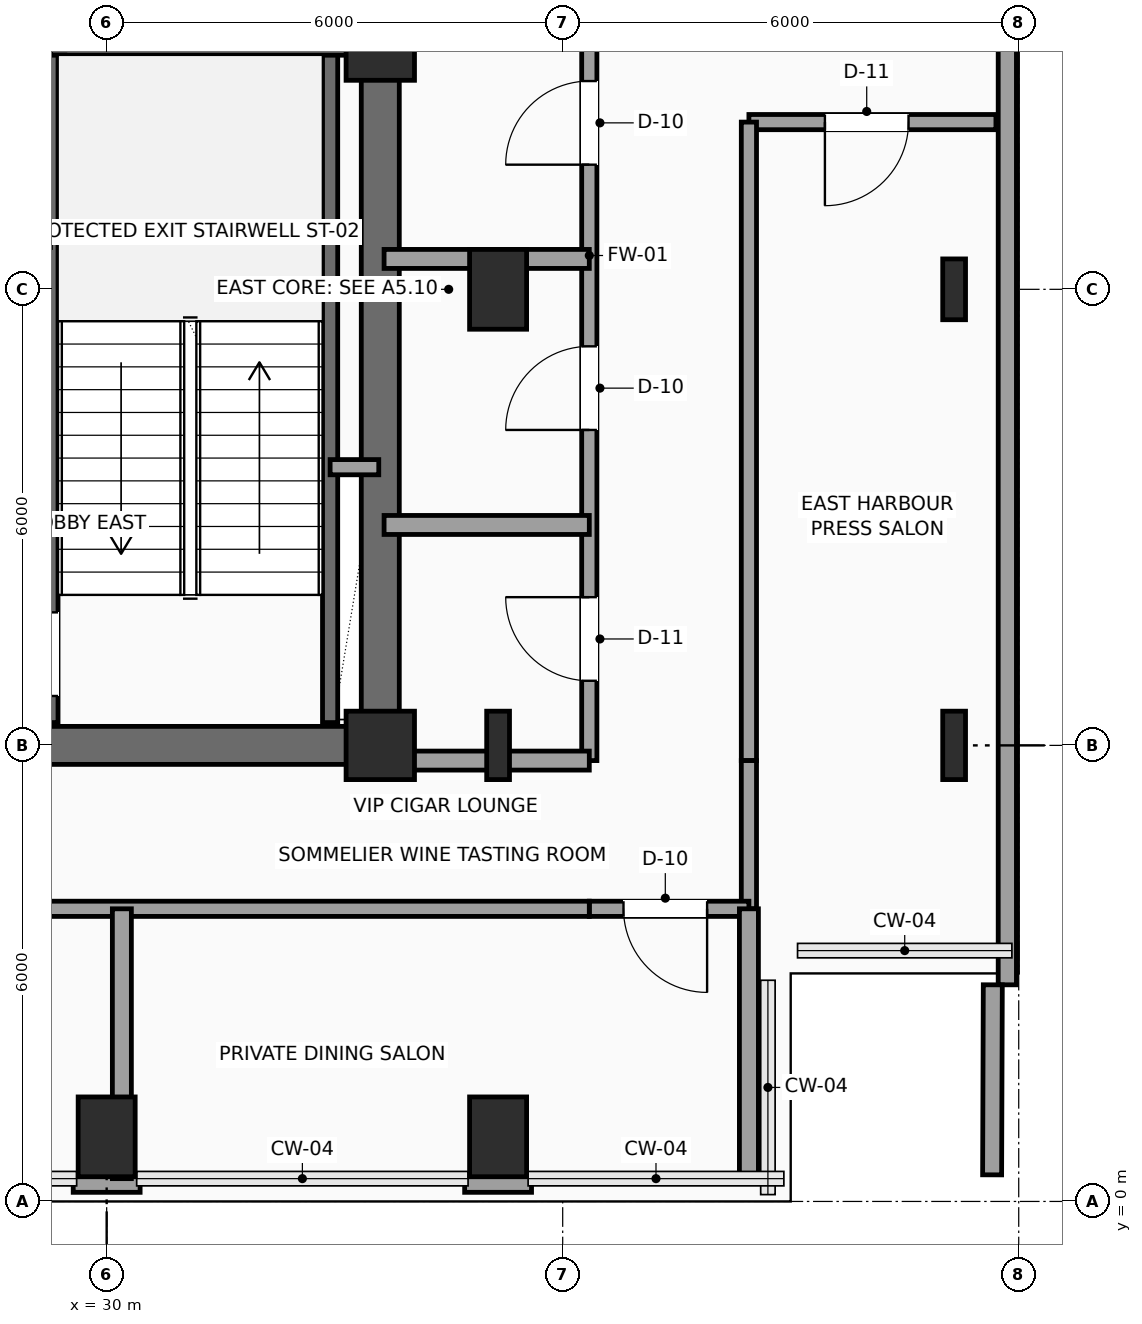
"""IFC4 building model, lengths in metres.
Left out: names, types, materials, properties, quantities, classifications, styles, units other than length and angle.
Written with IfcOpenShell. Run it as: python <this file> out.ifc"""

import sys

from ifc_helpers import new_model, si_unit, direction, frame, frame_2d, origin, origin_2d, place, context, subcontext, project, spatial, rectangle, i_section, extrude, element, fill, save


model = new_model("IFC4")
c1 = context("Model", 3, precision=1e-05, world=origin(), true_north=direction((0.0, 1.0)))
c2 = subcontext(c1, "Body", "Model", "MODEL_VIEW")
j1 = project(units=[si_unit("LENGTHUNIT", "METRE"), si_unit("PLANEANGLEUNIT", "RADIAN")], contexts=[c1])
p1 = place(None, origin())
s1 = spatial("IfcSite", under=j1, at=p1, CompositionType="ELEMENT")
p2 = place(p1, origin())
s2 = spatial("IfcBuilding", under=s1, at=p2, CompositionType="ELEMENT")
p3 = place(p2, frame((0.0, 0.0, 187.95)))
s3 = spatial("IfcBuildingStorey", under=s2, at=p3, CompositionType="ELEMENT", Elevation=187.95)
for number, where, z_axis, x_axis in (
    (1, (33.6, 6.0, 0.0), (0.0, 0.0, 1.0), (1.0, 0.0, 0.0)),
    (2, (33.6, 15.2, 0.0), (0.0, 0.0, 1.0), (1.0, 0.0, 0.0)),
):
    element("IfcColumn", number, at=place(p3, frame(where, z_axis=z_axis, x_axis=x_axis)), inside=s3, PredefinedType="COLUMN", context=c2, shape_type="SweptSolid", body=[
        extrude(rectangle(XDim=0.9, YDim=0.9, at=origin_2d()), origin(), (0.0, 0.0, 1.0), 3.75),
    ])
for number, where, z_axis, x_axis in (
    (3, (30.0, 0.85, 0.0), (0.0, 0.0, 1.0), (1.0, 0.0, 0.0)),
    (4, (35.15, 0.85, 0.0), (0.0, 0.0, 1.0), (1.0, 0.0, 0.0)),
):
    element("IfcColumn", number, at=place(p3, frame(where, z_axis=z_axis, x_axis=x_axis)), inside=s3, PredefinedType="COLUMN", context=c2, shape_type="SweptSolid", body=[
        extrude(rectangle(XDim=0.75, YDim=1.05, at=origin_2d()), origin(), (0.0, 0.0, 1.0), 3.75),
    ])
p4 = place(p3, frame((35.15, 6.0, 0.0), z_axis=(0.0, 0.0, 1.0), x_axis=(1.0, 0.0, 0.0)))
e5 = element("IfcColumn", 5, at=p4, inside=s3, PredefinedType="COLUMN", context=c2, shape_type="SweptSolid", body=[
    extrude(i_section(OverallWidth=0.3, OverallDepth=0.9, WebThickness=0.019, FlangeThickness=0.035, FilletRadius=0.03, at=origin_2d()), origin(), (0.0, 0.0, 1.0), 3.75),
])
p5 = place(p3, frame((35.15, 12.0, 0.0), z_axis=(0.0, 0.0, 1.0), x_axis=(1.0, 0.0, 0.0)))
e6 = element("IfcColumn", 6, at=p5, inside=s3, PredefinedType="COLUMN", context=c2, shape_type="SweptSolid", body=[
    extrude(rectangle(XDim=0.75, YDim=1.05, at=origin_2d()), origin(), (0.0, 0.0, 1.0), 3.75),
])
p6 = place(p3, frame((41.15, 6.0, 0.0), z_axis=(0.0, 0.0, 1.0), x_axis=(1.0, 0.0, 0.0)))
e7 = element("IfcColumn", 7, at=p6, inside=s3, PredefinedType="COLUMN", context=c2, shape_type="SweptSolid", body=[
    extrude(i_section(OverallWidth=0.3, OverallDepth=0.9, WebThickness=0.019, FlangeThickness=0.035, FilletRadius=0.03, at=origin_2d()), origin(), (0.0, 0.0, 1.0), 3.75),
])
p7 = place(p3, frame((41.15, 12.0, 0.0), z_axis=(0.0, 0.0, 1.0), x_axis=(1.0, 0.0, 0.0)))
e8 = element("IfcColumn", 8, at=p7, inside=s3, PredefinedType="COLUMN", context=c2, shape_type="SweptSolid", body=[
    extrude(i_section(OverallWidth=0.3, OverallDepth=0.8, WebThickness=0.018, FlangeThickness=0.033, FilletRadius=0.03, at=origin_2d()), origin(), (0.0, 0.0, 1.0), 3.75),
])
p8 = place(p3, frame((41.85, 21.15, 0.0), z_axis=(0.0, 0.0, 1.0), x_axis=(0.0, -1.0, 0.0)))
e9 = element("IfcWall", 9, at=p8, inside=s3, PredefinedType="SOLIDWALL", context=c2, shape_type="SweptSolid", body=[
    extrude(rectangle(XDim=18.3, YDim=0.24, at=frame_2d((9.15, 0.0))), origin(), (0.0, 0.0, 1.0), 3.54),
])
p9 = place(p3, frame((35.59, 0.24, 0.0), z_axis=(0.0, 0.0, 1.0), x_axis=(-1.0, 0.0, 0.0)))
e10 = element("IfcWall", 10, at=p9, inside=s3, PredefinedType="SOLIDWALL", context=c2, shape_type="SweptSolid", body=[
    extrude(rectangle(XDim=0.88, YDim=0.24, at=frame_2d((0.44, 0.0))), origin(), (0.0, 0.0, 1.0), 3.54),
])
p10 = place(p3, frame((30.44, 0.24, 0.0), z_axis=(0.0, 0.0, 1.0), x_axis=(-1.0, 0.0, 0.0)))
e11 = element("IfcWall", 11, at=p10, inside=s3, PredefinedType="SOLIDWALL", context=c2, shape_type="SweptSolid", body=[
    extrude(rectangle(XDim=0.88, YDim=0.24, at=frame_2d((0.44, 0.0))), origin(), (0.0, 0.0, 1.0), 3.54),
])
p11 = place(p3, frame((24.0, 6.0, 0.0), z_axis=(0.0, 0.0, 1.0), x_axis=(1.0, 0.0, 0.0)))
e12 = element("IfcWall", 12, at=p11, inside=s3, PredefinedType="SHEAR", context=c2, shape_type="SweptSolid", body=[
    extrude(rectangle(XDim=9.6, YDim=0.5, at=frame_2d((4.8, 0.0))), origin(), (0.0, 0.0, 1.0), 3.54),
])
p12 = place(p3, frame((33.6, 6.0, 0.0), z_axis=(0.0, 0.0, 1.0), x_axis=(0.0, 1.0, 0.0)))
e13 = element("IfcWall", 13, at=p12, inside=s3, PredefinedType="SHEAR", context=c2, shape_type="SweptSolid", body=[
    extrude(rectangle(XDim=12.0, YDim=0.5, at=frame_2d((6.0, 0.0))), origin(), (0.0, 0.0, 1.0), 3.54),
])
p13 = place(p12, frame((10.15, 0.0, 0.0)))
e14 = element("IfcOpeningElement", 14, at=p13, cuts=e13, PredefinedType="OPENING", context=c2, shape_type="SweptSolid", body=[
    extrude(rectangle(XDim=0.9, YDim=2.15, at=frame_2d((0.45, 1.075))), frame((0.0, 0.26, 0.0), z_axis=(0.0, -1.0, 0.0), x_axis=(1.0, 0.0, 0.0)), (0.0, 0.0, 1.0), 0.52),
])
p14 = place(p3, frame((29.26, 6.3, 0.0), z_axis=(0.0, 0.0, 1.0), x_axis=(0.0, 1.0, 0.0)))
e15 = element("IfcWall", 15, at=p14, inside=s3, PredefinedType="SHEAR", context=c2, shape_type="SweptSolid", body=[
    extrude(rectangle(XDim=8.88, YDim=0.2, at=frame_2d((4.44, 0.0))), origin(), (0.0, 0.0, 1.0), 3.54),
])
p15 = place(p14, frame((0.35, 0.0, 0.0)))
e16 = element("IfcOpeningElement", 16, at=p15, cuts=e15, PredefinedType="OPENING", context=c2, shape_type="SweptSolid", body=[
    extrude(rectangle(XDim=1.1, YDim=2.2, at=frame_2d((0.55, 1.1))), frame((0.0, 0.11, 0.0), z_axis=(0.0, -1.0, 0.0), x_axis=(1.0, 0.0, 0.0)), (0.0, 0.0, 1.0), 0.22),
])
p16 = place(p3, frame((32.94, 6.3, 0.0), z_axis=(0.0, 0.0, 1.0), x_axis=(0.0, 1.0, 0.0)))
e17 = element("IfcWall", 17, at=p16, inside=s3, PredefinedType="SHEAR", context=c2, shape_type="SweptSolid", body=[
    extrude(rectangle(XDim=8.88, YDim=0.2, at=frame_2d((4.44, 0.0))), origin(), (0.0, 0.0, 1.0), 3.54),
])
p17 = place(p3, frame((29.26, 15.18, 0.0), z_axis=(0.0, 0.0, 1.0), x_axis=(1.0, 0.0, 0.0)))
e18 = element("IfcWall", 18, at=p17, inside=s3, PredefinedType="SHEAR", context=c2, shape_type="SweptSolid", body=[
    extrude(rectangle(XDim=4.04, YDim=0.2, at=frame_2d((2.02, 0.0))), origin(), (0.0, 0.0, 1.0), 3.54),
])
p18 = place(p3, frame((32.94, 9.66, 0.0), z_axis=(0.0, 0.0, 1.0), x_axis=(1.0, 0.0, 0.0)))
e19 = element("IfcWall", 19, at=p18, inside=s3, PredefinedType="SOLIDWALL", context=c2, shape_type="SweptSolid", body=[
    extrude(rectangle(XDim=0.64, YDim=0.2, at=frame_2d((0.32, 0.0))), origin(), (0.0, 0.0, 1.0), 3.54),
])
p19 = place(p3, frame((36.35, 5.8, 0.0), z_axis=(0.0, 0.0, 1.0), x_axis=(0.0, 1.0, 0.0)))
e20 = element("IfcWall", 20, at=p19, inside=s3, PredefinedType="SOLIDWALL", context=c2, shape_type="SweptSolid", body=[
    extrude(rectangle(XDim=10.08, YDim=0.2, at=frame_2d((5.04, 0.0))), origin(), (0.0, 0.0, 1.0), 3.54),
])
p20 = place(p19, frame((1.05, 0.0, 0.0)))
e21 = element("IfcOpeningElement", 21, at=p20, cuts=e20, PredefinedType="OPENING", context=c2, shape_type="SweptSolid", body=[
    extrude(rectangle(XDim=1.1, YDim=2.25, at=frame_2d((0.55, 1.125))), frame((0.0, 0.11, 0.0), z_axis=(0.0, -1.0, 0.0), x_axis=(1.0, 0.0, 0.0)), (0.0, 0.0, 1.0), 0.22),
])
p21 = place(p19, frame((4.35, 0.0, 0.0)))
e22 = element("IfcOpeningElement", 22, at=p21, cuts=e20, PredefinedType="OPENING", context=c2, shape_type="SweptSolid", body=[
    extrude(rectangle(XDim=1.1, YDim=2.25, at=frame_2d((0.55, 1.125))), frame((0.0, 0.11, 0.0), z_axis=(0.0, -1.0, 0.0), x_axis=(1.0, 0.0, 0.0)), (0.0, 0.0, 1.0), 0.22),
])
p22 = place(p19, frame((7.84, 0.0, 0.0)))
e23 = element("IfcOpeningElement", 23, at=p22, cuts=e20, PredefinedType="OPENING", context=c2, shape_type="SweptSolid", body=[
    extrude(rectangle(XDim=1.1, YDim=2.25, at=frame_2d((0.55, 1.125))), frame((0.0, 0.11, 0.0), z_axis=(0.0, -1.0, 0.0), x_axis=(1.0, 0.0, 0.0)), (0.0, 0.0, 1.0), 0.22),
])
p23 = place(p3, frame((41.7, 14.2, 0.0), z_axis=(0.0, 0.0, 1.0), x_axis=(-1.0, 0.0, 0.0)))
e24 = element("IfcWall", 24, at=p23, inside=s3, PredefinedType="SOLIDWALL", context=c2, shape_type="SweptSolid", body=[
    extrude(rectangle(XDim=3.25, YDim=0.2, at=frame_2d((1.625, 0.0))), origin(), (0.0, 0.0, 1.0), 3.54),
])
p24 = place(p23, frame((1.15, 0.0, 0.0)))
e25 = element("IfcOpeningElement", 25, at=p24, cuts=e24, PredefinedType="OPENING", context=c2, shape_type="SweptSolid", body=[
    extrude(rectangle(XDim=1.1, YDim=2.25, at=frame_2d((0.55, 1.125))), frame((0.0, 0.11, 0.0), z_axis=(0.0, -1.0, 0.0), x_axis=(1.0, 0.0, 0.0)), (0.0, 0.0, 1.0), 0.22),
])
p25 = place(p3, frame((38.45, 14.2, 0.0), z_axis=(0.0, 0.0, 1.0), x_axis=(0.0, -1.0, 0.0)))
e26 = element("IfcWall", 26, at=p25, inside=s3, PredefinedType="SOLIDWALL", context=c2, shape_type="SweptSolid", body=[
    extrude(rectangle(XDim=8.4, YDim=0.2, at=frame_2d((4.2, 0.0))), origin(), (0.0, 0.0, 1.0), 3.54),
])
p26 = place(p3, frame((38.45, 5.8, 0.0), z_axis=(0.0, 0.0, 1.0), x_axis=(0.0, -1.0, 0.0)))
e27 = element("IfcWall", 27, at=p26, inside=s3, PredefinedType="SOLIDWALL", context=c2, shape_type="SweptSolid", body=[
    extrude(rectangle(XDim=1.95, YDim=0.2, at=frame_2d((0.975, 0.0))), origin(), (0.0, 0.0, 1.0), 3.54),
])
p27 = place(p3, frame((38.45, 3.85, 0.0), z_axis=(0.0, 0.0, 1.0), x_axis=(-1.0, 0.0, 0.0)))
e28 = element("IfcWall", 28, at=p27, inside=s3, PredefinedType="SOLIDWALL", context=c2, shape_type="SweptSolid", body=[
    extrude(rectangle(XDim=2.1, YDim=0.2, at=frame_2d((1.05, 0.0))), origin(), (0.0, 0.0, 1.0), 3.54),
])
p28 = place(p27, frame((0.55, 0.0, 0.0)))
e29 = element("IfcOpeningElement", 29, at=p28, cuts=e28, PredefinedType="OPENING", context=c2, shape_type="SweptSolid", body=[
    extrude(rectangle(XDim=1.1, YDim=2.25, at=frame_2d((0.55, 1.125))), frame((0.0, 0.11, 0.0), z_axis=(0.0, -1.0, 0.0), x_axis=(1.0, 0.0, 0.0)), (0.0, 0.0, 1.0), 0.22),
])
p29 = place(p3, frame((36.35, 3.85, 0.0), z_axis=(0.0, 0.0, 1.0), x_axis=(-1.0, 0.0, 0.0)))
e30 = element("IfcWall", 30, at=p29, inside=s3, PredefinedType="SOLIDWALL", context=c2, shape_type="SweptSolid", body=[
    extrude(rectangle(XDim=12.4, YDim=0.2, at=frame_2d((6.2, 0.0))), origin(), (0.0, 0.0, 1.0), 3.54),
])
p30 = place(p29, frame((8.775, 0.0, 0.0)))
e31 = element("IfcOpeningElement", 31, at=p30, cuts=e30, PredefinedType="OPENING", context=c2, shape_type="SweptSolid", body=[
    extrude(rectangle(XDim=1.1, YDim=2.25, at=frame_2d((0.55, 1.125))), frame((0.0, 0.11, 0.0), z_axis=(0.0, -1.0, 0.0), x_axis=(1.0, 0.0, 0.0)), (0.0, 0.0, 1.0), 0.22),
])
for number, where, z_axis, x_axis in (
    (32, (30.2, 0.3, 0.0), (0.0, 0.0, 1.0), (0.0, 1.0, 0.0)),
    (33, (38.45, 0.3, 0.0), (0.0, 0.0, 1.0), (0.0, 1.0, 0.0)),
):
    element("IfcWall", number, at=place(p3, frame(where, z_axis=z_axis, x_axis=x_axis)), inside=s3, PredefinedType="PARTITIONING", context=c2, shape_type="SweptSolid", body=[
        extrude(rectangle(XDim=3.55, YDim=0.25, at=frame_2d((1.775, 0.0))), origin(), (0.0, 0.0, 1.0), 3.54),
    ])
for number, where, z_axis, x_axis in (
    (34, (33.65, 5.8, 0.0), (0.0, 0.0, 1.0), (1.0, 0.0, 0.0)),
    (35, (33.65, 8.9, 0.0), (0.0, 0.0, 1.0), (1.0, 0.0, 0.0)),
):
    element("IfcWall", number, at=place(p3, frame(where, z_axis=z_axis, x_axis=x_axis)), inside=s3, PredefinedType="PARTITIONING", context=c2, shape_type="SweptSolid", body=[
        extrude(rectangle(XDim=2.7, YDim=0.25, at=frame_2d((1.35, 0.0))), origin(), (0.0, 0.0, 1.0), 3.132),
    ])
p31 = place(p3, frame((33.65, 12.4, 0.0), z_axis=(0.0, 0.0, 1.0), x_axis=(1.0, 0.0, 0.0)))
e36 = element("IfcWall", 36, at=p31, inside=s3, PredefinedType="PARTITIONING", context=c2, shape_type="SweptSolid", body=[
    extrude(rectangle(XDim=2.7, YDim=0.25, at=frame_2d((1.35, 0.0))), origin(), (0.0, 0.0, 1.0), 3.54),
])
p32 = place(p3, frame((41.65, 0.35, 0.0), z_axis=(0.0, 0.0, 1.0), x_axis=(0.003613257663, 0.999993472163, 0.0)))
e37 = element("IfcWall", 37, at=p32, inside=s3, PredefinedType="PARTITIONING", context=c2, shape_type="SweptSolid", body=[
    extrude(rectangle(XDim=2.5, YDim=0.25, at=frame_2d((1.25, 0.0))), origin(), (0.0, 0.0, 1.0), 3.54),
])
p33 = place(p15, origin())
e38 = element("IfcDoor", 38, at=p33, inside=s3, OperationType="SINGLE_SWING_RIGHT", PredefinedType="DOOR", context=c2, shape_type="SweptSolid", body=[
    extrude(rectangle(XDim=1.1, YDim=2.2, at=frame_2d((0.55, 1.1))), frame((0.0, 0.025, 0.0), z_axis=(0.0, -1.0, 0.0), x_axis=(1.0, 0.0, 0.0)), (0.0, 0.0, 1.0), 0.05),
])
fill(e16, e38)
p34 = place(p20, origin())
e39 = element("IfcDoor", 39, at=p34, inside=s3, OperationType="SINGLE_SWING_RIGHT", PredefinedType="DOOR", context=c2, shape_type="SweptSolid", body=[
    extrude(rectangle(XDim=1.1, YDim=2.25, at=frame_2d((0.55, 1.125))), frame((0.0, 0.025, 0.0), z_axis=(0.0, -1.0, 0.0), x_axis=(1.0, 0.0, 0.0)), (0.0, 0.0, 1.0), 0.05),
])
fill(e21, e39)
p35 = place(p21, origin())
e40 = element("IfcDoor", 40, at=p35, inside=s3, OperationType="SINGLE_SWING_LEFT", PredefinedType="DOOR", context=c2, shape_type="SweptSolid", body=[
    extrude(rectangle(XDim=1.1, YDim=2.25, at=frame_2d((0.55, 1.125))), frame((0.0, 0.025, 0.0), z_axis=(0.0, -1.0, 0.0), x_axis=(1.0, 0.0, 0.0)), (0.0, 0.0, 1.0), 0.05),
])
fill(e22, e40)
p36 = place(p22, origin())
e41 = element("IfcDoor", 41, at=p36, inside=s3, OperationType="SINGLE_SWING_LEFT", PredefinedType="DOOR", context=c2, shape_type="SweptSolid", body=[
    extrude(rectangle(XDim=1.1, YDim=2.25, at=frame_2d((0.55, 1.125))), frame((0.0, 0.025, 0.0), z_axis=(0.0, -1.0, 0.0), x_axis=(1.0, 0.0, 0.0)), (0.0, 0.0, 1.0), 0.05),
])
fill(e23, e41)
p37 = place(p24, origin())
e42 = element("IfcDoor", 42, at=p37, inside=s3, OperationType="SINGLE_SWING_RIGHT", PredefinedType="DOOR", context=c2, shape_type="SweptSolid", body=[
    extrude(rectangle(XDim=1.1, YDim=2.25, at=frame_2d((0.55, 1.125))), frame((0.0, 0.025, 0.0), z_axis=(0.0, -1.0, 0.0), x_axis=(1.0, 0.0, 0.0)), (0.0, 0.0, 1.0), 0.05),
])
fill(e25, e42)
p38 = place(p28, origin())
e43 = element("IfcDoor", 43, at=p38, inside=s3, OperationType="SINGLE_SWING_LEFT", PredefinedType="DOOR", context=c2, shape_type="SweptSolid", body=[
    extrude(rectangle(XDim=1.1, YDim=2.25, at=frame_2d((0.55, 1.125))), frame((0.0, 0.025, 0.0), z_axis=(0.0, -1.0, 0.0), x_axis=(1.0, 0.0, 0.0)), (0.0, 0.0, 1.0), 0.05),
])
fill(e29, e43)
save(model, sys.argv[1])
